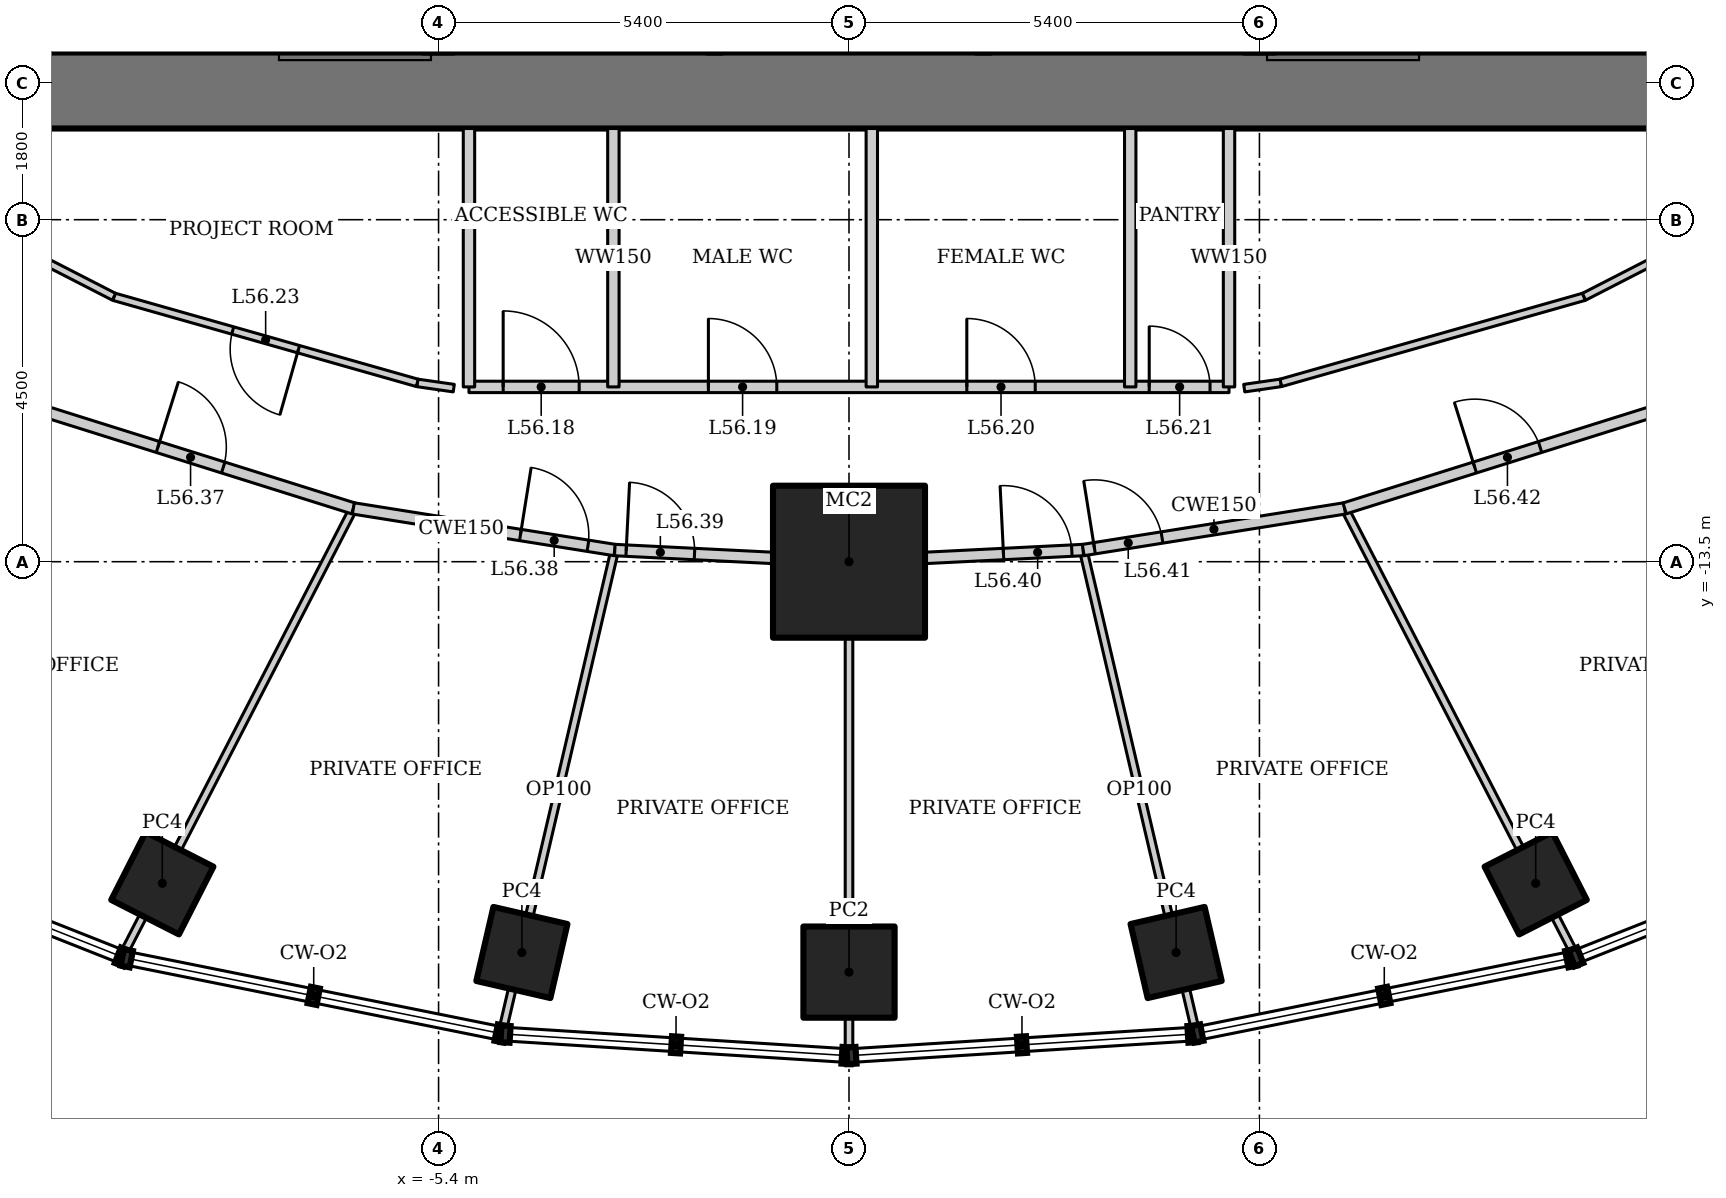
"""IFC4 building model, lengths in metres.
Left out: names, types, materials, properties, quantities, classifications, styles, units other than length and angle.
Written with IfcOpenShell. Run it as: python <this file> out.ifc"""

import sys

from ifc_helpers import new_model, si_unit, direction, frame, frame_2d, origin, origin_2d, place, context, subcontext, project, spatial, rectangle, hollow_rectangle, extrude, element, fill, save


model = new_model("IFC4")
c1 = context("Model", 3, precision=1e-05, world=origin(), true_north=direction((0.0, 1.0)))
c2 = subcontext(c1, "Body", "Model", "MODEL_VIEW")
j1 = project(units=[si_unit("LENGTHUNIT", "METRE"), si_unit("PLANEANGLEUNIT", "RADIAN")], contexts=[c1])
p1 = place(None, origin())
s1 = spatial("IfcSite", under=j1, at=p1, CompositionType="ELEMENT")
p2 = place(p1, origin())
s2 = spatial("IfcBuilding", under=s1, at=p2, CompositionType="ELEMENT")
p3 = place(p2, frame((0.0, 0.0, 241.0)))
s3 = spatial("IfcBuildingStorey", under=s2, at=p3, CompositionType="ELEMENT", Elevation=241.0)
p4 = place(p3, frame((0.0, -13.5, 0.0), z_axis=(0.0, 0.0, 1.0), x_axis=(1.0, 0.0, 0.0)))
e1 = element("IfcColumn", 1, at=p4, inside=s3, PredefinedType="COLUMN", context=c2, shape_type="SweptSolid", body=[
    extrude(hollow_rectangle(XDim=2.0, YDim=2.0, WallThickness=0.17, at=origin_2d()), origin(), (0.0, 0.0, 1.0), 4.2),
])
for number, where, z_axis, x_axis in (
    (2, (-9.035, -17.731, 0.0), (0.0, 0.0, 1.0), (0.454, 0.891, 0.0)),
    (3, (-4.304, -18.642, 0.0), (0.0, 0.0, 1.0), (0.225, 0.974, 0.0)),
):
    element("IfcColumn", number, at=place(p3, frame(where, z_axis=z_axis, x_axis=x_axis)), inside=s3, PredefinedType="COLUMN", context=c2, shape_type="SweptSolid", body=[
        extrude(hollow_rectangle(XDim=1.0, YDim=1.0, WallThickness=0.08, at=origin_2d()), origin(), (0.0, 0.0, 1.0), 4.2),
    ])
p5 = place(p3, frame((0.0, -18.9, 0.0), z_axis=(0.0, 0.0, 1.0), x_axis=(1.0, 0.0, 0.0)))
e4 = element("IfcColumn", 4, at=p5, inside=s3, PredefinedType="COLUMN", context=c2, shape_type="SweptSolid", body=[
    extrude(hollow_rectangle(XDim=1.2, YDim=1.2, WallThickness=0.1, at=origin_2d()), origin(), (0.0, 0.0, 1.0), 4.2),
])
for number, where, z_axis, x_axis in (
    (5, (4.304, -18.642, 0.0), (0.0, 0.0, 1.0), (0.974, 0.225, 0.0)),
    (6, (9.035, -17.731, 0.0), (0.0, 0.0, 1.0), (0.891, 0.454, 0.0)),
):
    element("IfcColumn", number, at=place(p3, frame(where, z_axis=z_axis, x_axis=x_axis)), inside=s3, PredefinedType="COLUMN", context=c2, shape_type="SweptSolid", body=[
        extrude(hollow_rectangle(XDim=1.0, YDim=1.0, WallThickness=0.08, at=origin_2d()), origin(), (0.0, 0.0, 1.0), 4.2),
    ])
p6 = place(p3, frame((-12.2, -7.3, 0.0), z_axis=(0.0, 0.0, 1.0), x_axis=(1.0, 0.0, 0.0)))
e7 = element("IfcWall", 7, at=p6, inside=s3, PredefinedType="SHEAR", context=c2, shape_type="SweptSolid", body=[
    extrude(rectangle(XDim=24.4, YDim=1.0, at=frame_2d((12.2, 0.0))), origin(), (0.0, 0.0, 1.0), 4.2),
])
for number, where, z_axis, x_axis in (
    (8, (-1.767, -2.6, 0.0), (0.0, 0.0, 1.0), (0.0, -1.0, 0.0)),
    (9, (1.767, -2.6, 0.0), (0.0, 0.0, 1.0), (0.0, -1.0, 0.0)),
):
    element("IfcWall", number, at=place(p3, frame(where, z_axis=z_axis, x_axis=x_axis)), inside=s3, PredefinedType="SOLIDWALL", context=c2, shape_type="SweptSolid", body=[
        extrude(rectangle(XDim=4.2, YDim=0.2, at=frame_2d((2.1, 0.0))), origin(), (0.0, 0.0, 1.0), 4.2),
    ])
p7 = place(p3, frame((-9.54, -18.65, 0.0), z_axis=(0.0, 0.0, 1.0), x_axis=(0.458420942987, 0.888735190611, 0.0)))
e10 = element("IfcWall", 10, at=p7, inside=s3, PredefinedType="PARTITIONING", context=c2, shape_type="SweptSolid", body=[
    extrude(rectangle(XDim=6.584, YDim=0.1, at=frame_2d((3.292, 0.0))), origin(), (0.0, 0.0, 1.0), 3.293),
])
p8 = place(p3, frame((-4.556, -19.657, 0.0), z_axis=(0.0, 0.0, 1.0), x_axis=(0.227524978141, 0.973772244584, 0.0)))
e11 = element("IfcWall", 11, at=p8, inside=s3, PredefinedType="PARTITIONING", context=c2, shape_type="SweptSolid", body=[
    extrude(rectangle(XDim=6.48, YDim=0.1, at=frame_2d((3.24, 0.0))), origin(), (0.0, 0.0, 1.0), 3.293),
])
p9 = place(p3, frame((0.0, -19.945, 0.0), z_axis=(0.0, 0.0, 1.0), x_axis=(0.0, 1.0, 0.0)))
e12 = element("IfcWall", 12, at=p9, inside=s3, PredefinedType="PARTITIONING", context=c2, shape_type="SweptSolid", body=[
    extrude(rectangle(XDim=6.445, YDim=0.1, at=frame_2d((3.222, 0.0))), origin(), (0.0, 0.0, 1.0), 3.646),
])
p10 = place(p3, frame((4.556, -19.657, 0.0), z_axis=(0.0, 0.0, 1.0), x_axis=(-0.227524978141, 0.973772244584, 0.0)))
e13 = element("IfcWall", 13, at=p10, inside=s3, PredefinedType="PARTITIONING", context=c2, shape_type="SweptSolid", body=[
    extrude(rectangle(XDim=6.48, YDim=0.1, at=frame_2d((3.24, 0.0))), origin(), (0.0, 0.0, 1.0), 3.293),
])
p11 = place(p3, frame((9.54, -18.65, 0.0), z_axis=(0.0, 0.0, 1.0), x_axis=(-0.458420942987, 0.888735190611, 0.0)))
e14 = element("IfcWall", 14, at=p11, inside=s3, PredefinedType="PARTITIONING", context=c2, shape_type="SweptSolid", body=[
    extrude(rectangle(XDim=6.584, YDim=0.1, at=frame_2d((3.292, 0.0))), origin(), (0.0, 0.0, 1.0), 3.293),
])
p12 = place(p3, frame((-11.001, -11.392, 0.0), z_axis=(0.0, 0.0, 1.0), x_axis=(0.954031103669, -0.299707612903, 0.0)))
e15 = element("IfcWall", 15, at=p12, inside=s3, PredefinedType="PARTITIONING", context=c2, shape_type="SweptSolid", body=[
    extrude(rectangle(XDim=4.695, YDim=0.15, at=frame_2d((2.348, 0.0))), origin(), (0.0, 0.0, 1.0), 4.05),
])
p13 = place(p12, frame((2.0, 0.0, 0.0)))
e16 = element("IfcOpeningElement", 16, at=p13, cuts=e15, PredefinedType="OPENING", context=c2, shape_type="SweptSolid", body=[
    extrude(rectangle(XDim=0.9, YDim=2.1, at=frame_2d((0.45, 1.05))), frame((0.0, 0.085, 0.0), z_axis=(0.0, -1.0, 0.0), x_axis=(1.0, 0.0, 0.0)), (0.0, 0.0, 1.0), 0.17),
])
p14 = place(p3, frame((-6.521, -12.799, 0.0), z_axis=(0.0, 0.0, 1.0), x_axis=(0.987554093087, -0.157279729233, 0.0)))
e17 = element("IfcWall", 17, at=p14, inside=s3, PredefinedType="PARTITIONING", context=c2, shape_type="SweptSolid", body=[
    extrude(rectangle(XDim=3.483, YDim=0.15, at=frame_2d((1.742, 0.0))), origin(), (0.0, 0.0, 1.0), 4.05),
])
p15 = place(p14, frame((2.226, 0.0, 0.0)))
e18 = element("IfcOpeningElement", 18, at=p15, cuts=e17, PredefinedType="OPENING", context=c2, shape_type="SweptSolid", body=[
    extrude(rectangle(XDim=0.9, YDim=2.1, at=frame_2d((0.45, 1.05))), frame((0.0, 0.085, 0.0), z_axis=(0.0, -1.0, 0.0), x_axis=(1.0, 0.0, 0.0)), (0.0, 0.0, 1.0), 0.17),
])
p16 = place(p3, frame((-3.081, -13.347, 0.0), z_axis=(0.0, 0.0, 1.0), x_axis=(0.99876434787, -0.049696855278, 0.0)))
e19 = element("IfcWall", 19, at=p16, inside=s3, PredefinedType="PARTITIONING", context=c2, shape_type="SweptSolid", body=[
    extrude(rectangle(XDim=3.085, YDim=0.15, at=frame_2d((1.542, 0.0))), origin(), (0.0, 0.0, 1.0), 4.05),
])
p17 = place(p16, frame((0.15, 0.0, 0.0)))
e20 = element("IfcOpeningElement", 20, at=p17, cuts=e19, PredefinedType="OPENING", context=c2, shape_type="SweptSolid", body=[
    extrude(rectangle(XDim=0.9, YDim=2.1, at=frame_2d((0.45, 1.05))), frame((0.0, 0.085, 0.0), z_axis=(0.0, -1.0, 0.0), x_axis=(1.0, 0.0, 0.0)), (0.0, 0.0, 1.0), 0.17),
])
p18 = place(p3, frame((0.0, -13.5, 0.0), z_axis=(0.0, 0.0, 1.0), x_axis=(0.99876434787, 0.049696855278, 0.0)))
e21 = element("IfcWall", 21, at=p18, inside=s3, PredefinedType="PARTITIONING", context=c2, shape_type="SweptSolid", body=[
    extrude(rectangle(XDim=3.085, YDim=0.15, at=frame_2d((1.542, 0.0))), origin(), (0.0, 0.0, 1.0), 4.05),
])
p19 = place(p18, frame((2.035, 0.0, 0.0)))
e22 = element("IfcOpeningElement", 22, at=p19, cuts=e21, PredefinedType="OPENING", context=c2, shape_type="SweptSolid", body=[
    extrude(rectangle(XDim=0.9, YDim=2.1, at=frame_2d((0.45, 1.05))), frame((0.0, 0.085, 0.0), z_axis=(0.0, -1.0, 0.0), x_axis=(1.0, 0.0, 0.0)), (0.0, 0.0, 1.0), 0.17),
])
p20 = place(p3, frame((3.081, -13.347, 0.0), z_axis=(0.0, 0.0, 1.0), x_axis=(0.987554093087, 0.157279729233, 0.0)))
e23 = element("IfcWall", 23, at=p20, inside=s3, PredefinedType="PARTITIONING", context=c2, shape_type="SweptSolid", body=[
    extrude(rectangle(XDim=3.483, YDim=0.15, at=frame_2d((1.742, 0.0))), origin(), (0.0, 0.0, 1.0), 4.05),
])
p21 = place(p20, frame((0.15, 0.0, 0.0)))
e24 = element("IfcOpeningElement", 24, at=p21, cuts=e23, PredefinedType="OPENING", context=c2, shape_type="SweptSolid", body=[
    extrude(rectangle(XDim=0.9, YDim=2.1, at=frame_2d((0.45, 1.05))), frame((0.0, 0.085, 0.0), z_axis=(0.0, -1.0, 0.0), x_axis=(1.0, 0.0, 0.0)), (0.0, 0.0, 1.0), 0.17),
])
p22 = place(p3, frame((6.521, -12.799, 0.0), z_axis=(0.0, 0.0, 1.0), x_axis=(0.954031103669, 0.299707612903, 0.0)))
e25 = element("IfcWall", 25, at=p22, inside=s3, PredefinedType="PARTITIONING", context=c2, shape_type="SweptSolid", body=[
    extrude(rectangle(XDim=4.695, YDim=0.15, at=frame_2d((2.348, 0.0))), origin(), (0.0, 0.0, 1.0), 4.05),
])
p23 = place(p22, frame((1.795, 0.0, 0.0)))
e26 = element("IfcOpeningElement", 26, at=p23, cuts=e25, PredefinedType="OPENING", context=c2, shape_type="SweptSolid", body=[
    extrude(rectangle(XDim=0.9, YDim=2.1, at=frame_2d((0.45, 1.05))), frame((0.0, 0.085, 0.0), z_axis=(0.0, -1.0, 0.0), x_axis=(1.0, 0.0, 0.0)), (0.0, 0.0, 1.0), 0.17),
])
p24 = place(p3, frame((-5.0, -11.2, 0.0), z_axis=(0.0, 0.0, 1.0), x_axis=(1.0, 0.0, 0.0)))
e27 = element("IfcWall", 27, at=p24, inside=s3, PredefinedType="SOLIDWALL", context=c2, shape_type="SweptSolid", body=[
    extrude(rectangle(XDim=10.0, YDim=0.15, at=frame_2d((5.0, 0.0))), origin(), (0.0, 0.0, 1.0), 4.05),
])
p25 = place(p24, frame((0.45, 0.0, 0.0)))
e28 = element("IfcOpeningElement", 28, at=p25, cuts=e27, PredefinedType="OPENING", context=c2, shape_type="SweptSolid", body=[
    extrude(rectangle(XDim=1.0, YDim=2.1, at=frame_2d((0.5, 1.05))), frame((0.0, 0.085, 0.0), z_axis=(0.0, -1.0, 0.0), x_axis=(1.0, 0.0, 0.0)), (0.0, 0.0, 1.0), 0.17),
])
p26 = place(p24, frame((3.15, 0.0, 0.0)))
e29 = element("IfcOpeningElement", 29, at=p26, cuts=e27, PredefinedType="OPENING", context=c2, shape_type="SweptSolid", body=[
    extrude(rectangle(XDim=0.9, YDim=2.1, at=frame_2d((0.45, 1.05))), frame((0.0, 0.085, 0.0), z_axis=(0.0, -1.0, 0.0), x_axis=(1.0, 0.0, 0.0)), (0.0, 0.0, 1.0), 0.17),
])
p27 = place(p24, frame((6.55, 0.0, 0.0)))
e30 = element("IfcOpeningElement", 30, at=p27, cuts=e27, PredefinedType="OPENING", context=c2, shape_type="SweptSolid", body=[
    extrude(rectangle(XDim=0.9, YDim=2.1, at=frame_2d((0.45, 1.05))), frame((0.0, 0.085, 0.0), z_axis=(0.0, -1.0, 0.0), x_axis=(1.0, 0.0, 0.0)), (0.0, 0.0, 1.0), 0.17),
])
p28 = place(p24, frame((8.95, 0.0, 0.0)))
e31 = element("IfcOpeningElement", 31, at=p28, cuts=e27, PredefinedType="OPENING", context=c2, shape_type="SweptSolid", body=[
    extrude(rectangle(XDim=0.8, YDim=2.1, at=frame_2d((0.4, 1.05))), frame((0.0, 0.085, 0.0), z_axis=(0.0, -1.0, 0.0), x_axis=(1.0, 0.0, 0.0)), (0.0, 0.0, 1.0), 0.17),
])
for number, where, z_axis, x_axis in (
    (32, (-5.0, -7.8, 0.0), (0.0, 0.0, 1.0), (0.0, -1.0, 0.0)),
    (33, (5.0, -7.8, 0.0), (0.0, 0.0, 1.0), (0.0, -1.0, 0.0)),
    (34, (-3.1, -7.8, 0.0), (0.0, 0.0, 1.0), (0.0, -1.0, 0.0)),
    (35, (0.3, -7.8, 0.0), (0.0, 0.0, 1.0), (0.0, -1.0, 0.0)),
    (36, (3.7, -7.8, 0.0), (0.0, 0.0, 1.0), (0.0, -1.0, 0.0)),
):
    element("IfcWall", number, at=place(p3, frame(where, z_axis=z_axis, x_axis=x_axis)), inside=s3, PredefinedType="SOLIDWALL", context=c2, shape_type="SweptSolid", body=[
        extrude(rectangle(XDim=3.4, YDim=0.15, at=frame_2d((1.7, 0.0))), origin(), (0.0, 0.0, 1.0), 4.05),
    ])
p29 = place(p3, frame((-5.2, -11.216, 0.0), z_axis=(0.0, 0.0, 1.0), x_axis=(-0.989797891768, 0.142478536811, 0.0)))
e37 = element("IfcWall", 37, at=p29, inside=s3, PredefinedType="PARTITIONING", context=c2, shape_type="SweptSolid", body=[
    extrude(rectangle(XDim=0.485, YDim=0.1, at=frame_2d((0.242, 0.0))), origin(), (0.0, 0.0, 1.0), 4.05),
])
p30 = place(p3, frame((-5.68, -11.147, 0.0), z_axis=(0.0, 0.0, 1.0), x_axis=(-0.961973498971, 0.273142796496, 0.0)))
e38 = element("IfcWall", 38, at=p30, inside=s3, PredefinedType="PARTITIONING", context=c2, shape_type="SweptSolid", body=[
    extrude(rectangle(XDim=4.148, YDim=0.1, at=frame_2d((2.074, 0.0))), origin(), (0.0, 0.0, 1.0), 4.05),
])
p31 = place(p30, frame((1.624, 0.0, 0.0)))
e39 = element("IfcOpeningElement", 39, at=p31, cuts=e38, PredefinedType="OPENING", context=c2, shape_type="SweptSolid", body=[
    extrude(rectangle(XDim=0.9, YDim=2.1, at=frame_2d((0.45, 1.05))), frame((0.0, 0.06, 0.0), z_axis=(0.0, -1.0, 0.0), x_axis=(1.0, 0.0, 0.0)), (0.0, 0.0, 1.0), 0.12),
])
p32 = place(p3, frame((-9.67, -10.014, 0.0), z_axis=(0.0, 0.0, 1.0), x_axis=(-0.889605609385, 0.456729525814, 0.0)))
e40 = element("IfcWall", 40, at=p32, inside=s3, PredefinedType="PARTITIONING", context=c2, shape_type="SweptSolid", body=[
    extrude(rectangle(XDim=2.293, YDim=0.1, at=frame_2d((1.146, 0.0))), origin(), (0.0, 0.0, 1.0), 4.05),
])
p33 = place(p3, frame((9.67, -10.014, 0.0), z_axis=(0.0, 0.0, 1.0), x_axis=(-0.961973498971, -0.273142796496, 0.0)))
e41 = element("IfcWall", 41, at=p33, inside=s3, PredefinedType="PARTITIONING", context=c2, shape_type="SweptSolid", body=[
    extrude(rectangle(XDim=4.148, YDim=0.1, at=frame_2d((2.074, 0.0))), origin(), (0.0, 0.0, 1.0), 4.05),
])
p34 = place(p3, frame((5.68, -11.147, 0.0), z_axis=(0.0, 0.0, 1.0), x_axis=(-0.989797891768, -0.142478536811, 0.0)))
e42 = element("IfcWall", 42, at=p34, inside=s3, PredefinedType="PARTITIONING", context=c2, shape_type="SweptSolid", body=[
    extrude(rectangle(XDim=0.485, YDim=0.1, at=frame_2d((0.242, 0.0))), origin(), (0.0, 0.0, 1.0), 4.05),
])
p35 = place(p3, frame((13.415, -8.092, 0.0), z_axis=(0.0, 0.0, 1.0), x_axis=(-0.889620520549, -0.45670048108, 0.0)))
e43 = element("IfcWall", 43, at=p35, inside=s3, PredefinedType="PARTITIONING", context=c2, shape_type="SweptSolid", body=[
    extrude(rectangle(XDim=4.209, YDim=0.1, at=frame_2d((2.104, 0.0))), origin(), (0.0, 0.0, 1.0), 4.05),
])
p36 = place(p25, origin())
e44 = element("IfcDoor", 44, at=p36, inside=s3, OperationType="SINGLE_SWING_LEFT", PredefinedType="DOOR", context=c2, shape_type="SweptSolid", body=[
    extrude(rectangle(XDim=1.0, YDim=2.1, at=frame_2d((0.5, 1.05))), frame((0.0, 0.025, 0.0), z_axis=(0.0, -1.0, 0.0), x_axis=(1.0, 0.0, 0.0)), (0.0, 0.0, 1.0), 0.05),
])
fill(e28, e44)
p37 = place(p26, origin())
e45 = element("IfcDoor", 45, at=p37, inside=s3, OperationType="SINGLE_SWING_LEFT", PredefinedType="DOOR", context=c2, shape_type="SweptSolid", body=[
    extrude(rectangle(XDim=0.9, YDim=2.1, at=frame_2d((0.45, 1.05))), frame((0.0, 0.025, 0.0), z_axis=(0.0, -1.0, 0.0), x_axis=(1.0, 0.0, 0.0)), (0.0, 0.0, 1.0), 0.05),
])
fill(e29, e45)
p38 = place(p27, origin())
e46 = element("IfcDoor", 46, at=p38, inside=s3, OperationType="SINGLE_SWING_LEFT", PredefinedType="DOOR", context=c2, shape_type="SweptSolid", body=[
    extrude(rectangle(XDim=0.9, YDim=2.1, at=frame_2d((0.45, 1.05))), frame((0.0, 0.025, 0.0), z_axis=(0.0, -1.0, 0.0), x_axis=(1.0, 0.0, 0.0)), (0.0, 0.0, 1.0), 0.05),
])
fill(e30, e46)
p39 = place(p28, origin())
e47 = element("IfcDoor", 47, at=p39, inside=s3, OperationType="SINGLE_SWING_LEFT", PredefinedType="DOOR", context=c2, shape_type="SweptSolid", body=[
    extrude(rectangle(XDim=0.8, YDim=2.1, at=frame_2d((0.4, 1.05))), frame((0.0, 0.025, 0.0), z_axis=(0.0, -1.0, 0.0), x_axis=(1.0, 0.0, 0.0)), (0.0, 0.0, 1.0), 0.05),
])
fill(e31, e47)
p40 = place(p31, origin())
e48 = element("IfcDoor", 48, at=p40, inside=s3, OperationType="SINGLE_SWING_LEFT", PredefinedType="DOOR", context=c2, shape_type="SweptSolid", body=[
    extrude(rectangle(XDim=0.9, YDim=2.1, at=frame_2d((0.45, 1.05))), frame((0.0, 0.025, 0.0), z_axis=(0.0, -1.0, 0.0), x_axis=(1.0, 0.0, 0.0)), (0.0, 0.0, 1.0), 0.05),
])
fill(e39, e48)
p41 = place(p13, origin())
e49 = element("IfcDoor", 49, at=p41, inside=s3, OperationType="SINGLE_SWING_LEFT", PredefinedType="DOOR", context=c2, shape_type="SweptSolid", body=[
    extrude(rectangle(XDim=0.9, YDim=2.1, at=frame_2d((0.45, 1.05))), frame((0.0, 0.025, 0.0), z_axis=(0.0, -1.0, 0.0), x_axis=(1.0, 0.0, 0.0)), (0.0, 0.0, 1.0), 0.05),
])
fill(e16, e49)
p42 = place(p15, origin())
e50 = element("IfcDoor", 50, at=p42, inside=s3, OperationType="SINGLE_SWING_LEFT", PredefinedType="DOOR", context=c2, shape_type="SweptSolid", body=[
    extrude(rectangle(XDim=0.9, YDim=2.1, at=frame_2d((0.45, 1.05))), frame((0.0, 0.025, 0.0), z_axis=(0.0, -1.0, 0.0), x_axis=(1.0, 0.0, 0.0)), (0.0, 0.0, 1.0), 0.05),
])
fill(e18, e50)
p43 = place(p17, origin())
e51 = element("IfcDoor", 51, at=p43, inside=s3, OperationType="SINGLE_SWING_LEFT", PredefinedType="DOOR", context=c2, shape_type="SweptSolid", body=[
    extrude(rectangle(XDim=0.9, YDim=2.1, at=frame_2d((0.45, 1.05))), frame((0.0, 0.025, 0.0), z_axis=(0.0, -1.0, 0.0), x_axis=(1.0, 0.0, 0.0)), (0.0, 0.0, 1.0), 0.05),
])
fill(e20, e51)
p44 = place(p19, origin())
e52 = element("IfcDoor", 52, at=p44, inside=s3, OperationType="SINGLE_SWING_LEFT", PredefinedType="DOOR", context=c2, shape_type="SweptSolid", body=[
    extrude(rectangle(XDim=0.9, YDim=2.1, at=frame_2d((0.45, 1.05))), frame((0.0, 0.025, 0.0), z_axis=(0.0, -1.0, 0.0), x_axis=(1.0, 0.0, 0.0)), (0.0, 0.0, 1.0), 0.05),
])
fill(e22, e52)
p45 = place(p21, origin())
e53 = element("IfcDoor", 53, at=p45, inside=s3, OperationType="SINGLE_SWING_LEFT", PredefinedType="DOOR", context=c2, shape_type="SweptSolid", body=[
    extrude(rectangle(XDim=0.9, YDim=2.1, at=frame_2d((0.45, 1.05))), frame((0.0, 0.025, 0.0), z_axis=(0.0, -1.0, 0.0), x_axis=(1.0, 0.0, 0.0)), (0.0, 0.0, 1.0), 0.05),
])
fill(e24, e53)
p46 = place(p23, origin())
e54 = element("IfcDoor", 54, at=p46, inside=s3, OperationType="SINGLE_SWING_LEFT", PredefinedType="DOOR", context=c2, shape_type="SweptSolid", body=[
    extrude(rectangle(XDim=0.9, YDim=2.1, at=frame_2d((0.45, 1.05))), frame((0.0, 0.025, 0.0), z_axis=(0.0, -1.0, 0.0), x_axis=(1.0, 0.0, 0.0)), (0.0, 0.0, 1.0), 0.05),
])
fill(e26, e54)
save(model, sys.argv[1])
